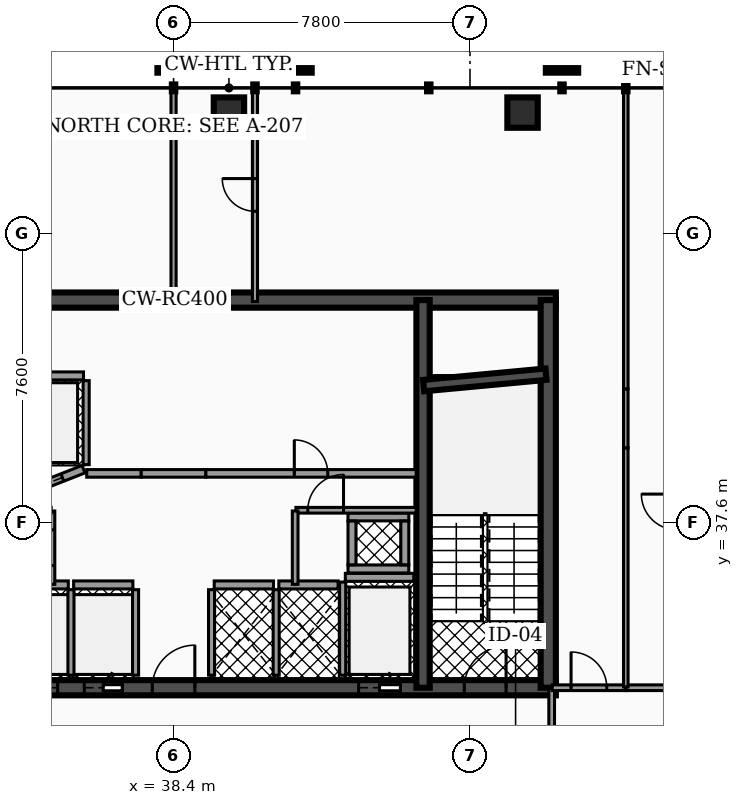
"""IFC4 building model, lengths in metres.
Left out: names, types, materials, properties, quantities, classifications, styles, units other than length and angle.
Written with IfcOpenShell. Run it as: python <this file> out.ifc"""

import sys

from ifc_helpers import new_model, si_unit, direction, frame, frame_2d, origin, origin_2d, place, context, subcontext, project, spatial, rectangle, hollow_rectangle, extrude, element, fill, save


model = new_model("IFC4")
c1 = context("Model", 3, precision=1e-05, world=origin(), true_north=direction((0.0, 1.0)))
c2 = subcontext(c1, "Body", "Model", "MODEL_VIEW")
j1 = project(units=[si_unit("LENGTHUNIT", "METRE"), si_unit("PLANEANGLEUNIT", "RADIAN")], contexts=[c1])
p1 = place(None, origin())
s1 = spatial("IfcSite", under=j1, at=p1, CompositionType="ELEMENT")
p2 = place(p1, origin())
s2 = spatial("IfcBuilding", under=s1, at=p2, CompositionType="ELEMENT")
p3 = place(p2, frame((0.0, 0.0, 149.6)))
s3 = spatial("IfcBuildingStorey", under=s2, at=p3, CompositionType="ELEMENT", Elevation=149.6)
p4 = place(p3, frame((28.4, 43.45, 0.0), z_axis=(0.0, 0.0, 1.0), x_axis=(1.0, 0.0, 0.0)))
e1 = element("IfcWall", 1, at=p4, inside=s3, PredefinedType="SHEAR", context=c2, shape_type="SweptSolid", body=[
    extrude(rectangle(XDim=20.06, YDim=0.4, at=frame_2d((10.03, 0.0))), origin(), (0.0, 0.0, 1.0), 3.5),
])
p5 = place(p3, frame((28.4, 33.25, 0.0), z_axis=(0.0, 0.0, 1.0), x_axis=(1.0, 0.0, 0.0)))
e2 = element("IfcWall", 2, at=p5, inside=s3, PredefinedType="SHEAR", context=c2, shape_type="SweptSolid", body=[
    extrude(rectangle(XDim=20.06, YDim=0.4, at=frame_2d((10.03, 0.0))), origin(), (0.0, 0.0, 1.0), 3.5),
])
p6 = place(p5, frame((4.03, 0.0, 0.0)))
e3 = element("IfcOpeningElement", 3, at=p6, cuts=e2, PredefinedType="OPENING", context=c2, shape_type="SweptSolid", body=[
    extrude(rectangle(XDim=1.1, YDim=2.15, at=frame_2d((0.55, 1.075))), frame((0.0, 0.21, 0.0), z_axis=(0.0, -1.0, 0.0), x_axis=(1.0, 0.0, 0.0)), (0.0, 0.0, 1.0), 0.42),
])
p7 = place(p5, frame((14.87, 0.0, 0.0)))
e4 = element("IfcOpeningElement", 4, at=p7, cuts=e2, PredefinedType="OPENING", context=c2, shape_type="SweptSolid", body=[
    extrude(rectangle(XDim=1.1, YDim=2.15, at=frame_2d((0.55, 1.075))), frame((0.0, 0.21, 0.0), z_axis=(0.0, -1.0, 0.0), x_axis=(1.0, 0.0, 0.0)), (0.0, 0.0, 1.0), 0.42),
])
p8 = place(p5, frame((5.95, 0.0, 0.0)))
e5 = element("IfcOpeningElement", 5, at=p8, cuts=e2, PredefinedType="OPENING", context=c2, shape_type="SweptSolid", body=[
    extrude(rectangle(XDim=1.0, YDim=2.1, at=frame_2d((0.5, 1.05))), frame((0.0, 0.21, 0.0), z_axis=(0.0, -1.0, 0.0), x_axis=(1.0, 0.0, 0.0)), (0.0, 0.0, 1.0), 0.42),
])
p9 = place(p5, frame((7.65, 0.0, 0.0)))
e6 = element("IfcOpeningElement", 6, at=p9, cuts=e2, PredefinedType="OPENING", context=c2, shape_type="SweptSolid", body=[
    extrude(rectangle(XDim=1.0, YDim=2.1, at=frame_2d((0.5, 1.05))), frame((0.0, 0.21, 0.0), z_axis=(0.0, -1.0, 0.0), x_axis=(1.0, 0.0, 0.0)), (0.0, 0.0, 1.0), 0.42),
])
p10 = place(p5, frame((1.31, 0.0, 0.0)))
e7 = element("IfcOpeningElement", 7, at=p10, cuts=e2, PredefinedType="OPENING", context=c2, shape_type="SweptSolid", body=[
    extrude(rectangle(XDim=1.1, YDim=2.2, at=frame_2d((0.55, 1.1))), frame((0.0, 0.21, 0.0), z_axis=(0.0, -1.0, 0.0), x_axis=(1.0, 0.0, 0.0)), (0.0, 0.0, 1.0), 0.42),
])
p11 = place(p5, frame((9.44, 0.0, 0.0)))
e8 = element("IfcOpeningElement", 8, at=p11, cuts=e2, PredefinedType="OPENING", context=c2, shape_type="SweptSolid", body=[
    extrude(rectangle(XDim=1.12, YDim=2.05, at=frame_2d((0.56, 1.025))), frame((0.0, 0.21, 0.0), z_axis=(0.0, -1.0, 0.0), x_axis=(1.0, 0.0, 0.0)), (0.0, 0.0, 1.0), 0.42),
])
p12 = place(p5, frame((17.65, 0.0, 0.0)))
e9 = element("IfcOpeningElement", 9, at=p12, cuts=e2, PredefinedType="OPENING", context=c2, shape_type="SweptSolid", body=[
    extrude(rectangle(XDim=1.1, YDim=2.2, at=frame_2d((0.55, 1.1))), frame((0.0, 0.21, 0.0), z_axis=(0.0, -1.0, 0.0), x_axis=(1.0, 0.0, 0.0)), (0.0, 0.0, 1.0), 0.42),
])
p13 = place(p3, frame((44.965, 33.25, 0.0), z_axis=(0.0, 0.0, 1.0), x_axis=(0.0, 1.0, 0.0)))
e10 = element("IfcWall", 10, at=p13, inside=s3, PredefinedType="SHEAR", context=c2, shape_type="SweptSolid", body=[
    extrude(rectangle(XDim=10.2, YDim=0.35, at=frame_2d((5.1, 0.0))), origin(), (0.0, 0.0, 1.0), 3.5),
])
p14 = place(p3, frame((48.26, 33.25, 0.0), z_axis=(0.0, 0.0, 1.0), x_axis=(0.0, 1.0, 0.0)))
e11 = element("IfcWall", 11, at=p14, inside=s3, PredefinedType="SHEAR", context=c2, shape_type="SweptSolid", body=[
    extrude(rectangle(XDim=10.2, YDim=0.4, at=frame_2d((5.1, 0.0))), origin(), (0.0, 0.0, 1.0), 3.5),
])
p15 = place(p3, frame((44.98, 41.2, 0.0), z_axis=(0.0, 0.0, 1.0), x_axis=(0.995686468965, 0.09278176286, 0.0)))
e12 = element("IfcWall", 12, at=p15, inside=s3, PredefinedType="SHEAR", context=c2, shape_type="SweptSolid", body=[
    extrude(rectangle(XDim=3.234, YDim=0.3, at=frame_2d((1.617, 0.0))), origin(), (0.0, 0.0, 1.0), 3.5),
])
for number, where, z_axis, x_axis in (
    (13, (47.583, 48.383, 0.0), (0.0, 0.0, 1.0), (1.0, 0.0, 0.0)),
    (14, (39.857, 48.383, 0.0), (0.0, 0.0, 1.0), (1.0, 0.0, 0.0)),
):
    element("IfcColumn", number, at=place(p3, frame(where, z_axis=z_axis, x_axis=x_axis)), inside=s3, PredefinedType="COLUMN", context=c2, shape_type="SweptSolid", body=[
        extrude(hollow_rectangle(XDim=0.8, YDim=0.8, WallThickness=0.04, at=origin_2d()), origin(), (0.0, 0.0, 1.0), 3.5),
    ])
p16 = place(p3, frame((42.92, 36.155, 0.0), z_axis=(0.0, 0.0, 1.0), x_axis=(1.0, 0.0, 0.0)))
e15 = element("IfcWall", 15, at=p16, inside=s3, PredefinedType="SOLIDWALL", context=c2, shape_type="SweptSolid", body=[
    extrude(rectangle(XDim=1.8, YDim=0.21, at=frame_2d((0.9, 0.0))), origin(), (0.0, 0.0, 1.0), 2.472),
])
p17 = place(p3, frame((42.85, 33.58, 0.0), z_axis=(0.0, 0.0, 1.0), x_axis=(0.0, 1.0, 0.0)))
e16 = element("IfcWall", 16, at=p17, inside=s3, PredefinedType="SOLIDWALL", context=c2, shape_type="SweptSolid", body=[
    extrude(rectangle(XDim=2.45, YDim=0.16, at=frame_2d((1.225, 0.0))), origin(), (0.0, 0.0, 1.0), 2.472),
])
p18 = place(p3, frame((34.07, 35.955, 0.0), z_axis=(0.0, 0.0, 1.0), x_axis=(1.0, 0.0, 0.0)))
e17 = element("IfcWall", 17, at=p18, inside=s3, PredefinedType="SOLIDWALL", context=c2, shape_type="SweptSolid", body=[
    extrude(rectangle(XDim=1.56, YDim=0.21, at=frame_2d((0.78, 0.0))), origin(), (0.0, 0.0, 1.0), 2.472),
])
p19 = place(p3, frame((35.7, 33.58, 0.0), z_axis=(0.0, 0.0, 1.0), x_axis=(0.0, 1.0, 0.0)))
e18 = element("IfcWall", 18, at=p19, inside=s3, PredefinedType="SOLIDWALL", context=c2, shape_type="SweptSolid", body=[
    extrude(rectangle(XDim=2.25, YDim=0.16, at=frame_2d((1.125, 0.0))), origin(), (0.0, 0.0, 1.0), 2.472),
])
p20 = place(p3, frame((35.77, 35.955, 0.0), z_axis=(0.0, 0.0, 1.0), x_axis=(1.0, 0.0, 0.0)))
e19 = element("IfcWall", 19, at=p20, inside=s3, PredefinedType="SOLIDWALL", context=c2, shape_type="SweptSolid", body=[
    extrude(rectangle(XDim=1.56, YDim=0.21, at=frame_2d((0.78, 0.0))), origin(), (0.0, 0.0, 1.0), 2.472),
])
p21 = place(p3, frame((37.4, 33.58, 0.0), z_axis=(0.0, 0.0, 1.0), x_axis=(0.0, 1.0, 0.0)))
e20 = element("IfcWall", 20, at=p21, inside=s3, PredefinedType="SOLIDWALL", context=c2, shape_type="SweptSolid", body=[
    extrude(rectangle(XDim=2.25, YDim=0.16, at=frame_2d((1.125, 0.0))), origin(), (0.0, 0.0, 1.0), 2.472),
])
p22 = place(p3, frame((34.12, 38.25, 0.0), z_axis=(0.0, 0.0, 1.0), x_axis=(0.930804993012, 0.36551616241, 0.0)))
e21 = element("IfcWall", 21, at=p22, inside=s3, PredefinedType="SOLIDWALL", context=c2, shape_type="SweptSolid", body=[
    extrude(rectangle(XDim=2.052, YDim=0.21, at=frame_2d((1.026, 0.0))), origin(), (0.0, 0.0, 1.0), 2.472),
])
p23 = place(p22, frame((0.455, 0.0, 0.0)))
e22 = element("IfcOpeningElement", 22, at=p23, cuts=e21, PredefinedType="OPENING", context=c2, shape_type="SweptSolid", body=[
    extrude(rectangle(XDim=1.0, YDim=2.1, at=frame_2d((0.5, 1.05))), frame((0.0, 0.115, 0.0), z_axis=(0.0, -1.0, 0.0), x_axis=(1.0, 0.0, 0.0)), (0.0, 0.0, 1.0), 0.23),
])
p24 = place(p3, frame((34.12, 41.455, 0.0), z_axis=(0.0, 0.0, 1.0), x_axis=(1.0, 0.0, 0.0)))
e23 = element("IfcWall", 23, at=p24, inside=s3, PredefinedType="SOLIDWALL", context=c2, shape_type="SweptSolid", body=[
    extrude(rectangle(XDim=1.91, YDim=0.21, at=frame_2d((0.955, 0.0))), origin(), (0.0, 0.0, 1.0), 2.472),
])
p25 = place(p3, frame((36.1, 39.12, 0.0), z_axis=(0.0, 0.0, 1.0), x_axis=(0.0, 1.0, 0.0)))
e24 = element("IfcWall", 24, at=p25, inside=s3, PredefinedType="SOLIDWALL", context=c2, shape_type="SweptSolid", body=[
    extrude(rectangle(XDim=2.21, YDim=0.16, at=frame_2d((1.105, 0.0))), origin(), (0.0, 0.0, 1.0), 2.472),
])
p26 = place(p3, frame((39.47, 35.955, 0.0), z_axis=(0.0, 0.0, 1.0), x_axis=(1.0, 0.0, 0.0)))
e25 = element("IfcWall", 25, at=p26, inside=s3, PredefinedType="SOLIDWALL", context=c2, shape_type="SweptSolid", body=[
    extrude(rectangle(XDim=1.56, YDim=0.21, at=frame_2d((0.78, 0.0))), origin(), (0.0, 0.0, 1.0), 2.472),
])
for number, where, z_axis, x_axis in (
    (26, (39.4, 33.58, 0.0), (0.0, 0.0, 1.0), (0.0, 1.0, 0.0)),
    (27, (41.1, 33.58, 0.0), (0.0, 0.0, 1.0), (0.0, 1.0, 0.0)),
):
    element("IfcWall", number, at=place(p3, frame(where, z_axis=z_axis, x_axis=x_axis)), inside=s3, PredefinedType="SOLIDWALL", context=c2, shape_type="SweptSolid", body=[
        extrude(rectangle(XDim=2.25, YDim=0.16, at=frame_2d((1.125, 0.0))), origin(), (0.0, 0.0, 1.0), 2.472),
    ])
p27 = place(p3, frame((41.17, 35.955, 0.0), z_axis=(0.0, 0.0, 1.0), x_axis=(1.0, 0.0, 0.0)))
e28 = element("IfcWall", 28, at=p27, inside=s3, PredefinedType="SOLIDWALL", context=c2, shape_type="SweptSolid", body=[
    extrude(rectangle(XDim=1.56, YDim=0.21, at=frame_2d((0.78, 0.0))), origin(), (0.0, 0.0, 1.0), 2.472),
])
for number, where, z_axis, x_axis in (
    (29, (42.99, 36.375, 0.0), (0.0, 0.0, 1.0), (1.0, 0.0, 0.0)),
    (30, (42.99, 37.745, 0.0), (0.0, 0.0, 1.0), (1.0, 0.0, 0.0)),
):
    element("IfcWall", number, at=place(p3, frame(where, z_axis=z_axis, x_axis=x_axis)), inside=s3, PredefinedType="SOLIDWALL", context=c2, shape_type="SweptSolid", body=[
        extrude(rectangle(XDim=1.6, YDim=0.21, at=frame_2d((0.8, 0.0))), origin(), (0.0, 0.0, 1.0), 3.5),
    ])
for number, where, z_axis, x_axis in (
    (31, (43.095, 36.485, 0.0), (0.0, 0.0, 1.0), (0.0, 1.0, 0.0)),
    (32, (44.485, 36.485, 0.0), (0.0, 0.0, 1.0), (0.0, 1.0, 0.0)),
):
    element("IfcWall", number, at=place(p3, frame(where, z_axis=z_axis, x_axis=x_axis)), inside=s3, PredefinedType="SOLIDWALL", context=c2, shape_type="SweptSolid", body=[
        extrude(rectangle(XDim=1.15, YDim=0.21, at=frame_2d((0.575, 0.0))), origin(), (0.0, 0.0, 1.0), 3.5),
    ])
p28 = place(p3, frame((35.2, 35.97, 0.0), z_axis=(0.0, 0.0, 1.0), x_axis=(0.0, 1.0, 0.0)))
e33 = element("IfcWall", 33, at=p28, inside=s3, PredefinedType="PARTITIONING", context=c2, shape_type="SweptSolid", body=[
    extrude(rectangle(XDim=1.93, YDim=0.15, at=frame_2d((0.965, 0.0))), origin(), (0.0, 0.0, 1.0), 2.457),
])
p29 = place(p28, frame((0.495, 0.0, 0.0)))
e34 = element("IfcOpeningElement", 34, at=p29, cuts=e33, PredefinedType="OPENING", context=c2, shape_type="SweptSolid", body=[
    extrude(rectangle(XDim=0.94, YDim=2.05, at=frame_2d((0.47, 1.025))), frame((0.0, 0.085, 0.0), z_axis=(0.0, -1.0, 0.0), x_axis=(1.0, 0.0, 0.0)), (0.0, 0.0, 1.0), 0.17),
])
p30 = place(p3, frame((36.115, 38.89, 0.0), z_axis=(0.0, 0.0, 1.0), x_axis=(1.0, 0.0, 0.0)))
e35 = element("IfcWall", 35, at=p30, inside=s3, PredefinedType="PARTITIONING", context=c2, shape_type="SweptSolid", body=[
    extrude(rectangle(XDim=1.435, YDim=0.2, at=frame_2d((0.718, 0.0))), origin(), (0.0, 0.0, 1.0), 2.457),
])
p31 = place(p3, frame((37.55, 38.89, 0.0), z_axis=(0.0, 0.0, 1.0), x_axis=(1.0, 0.0, 0.0)))
e36 = element("IfcWall", 36, at=p31, inside=s3, PredefinedType="PARTITIONING", context=c2, shape_type="SweptSolid", body=[
    extrude(rectangle(XDim=1.7, YDim=0.2, at=frame_2d((0.85, 0.0))), origin(), (0.0, 0.0, 1.0), 2.457),
])
p32 = place(p3, frame((39.25, 38.89, 0.0), z_axis=(0.0, 0.0, 1.0), x_axis=(1.0, 0.0, 0.0)))
e37 = element("IfcWall", 37, at=p32, inside=s3, PredefinedType="PARTITIONING", context=c2, shape_type="SweptSolid", body=[
    extrude(rectangle(XDim=5.535, YDim=0.2, at=frame_2d((2.768, 0.0))), origin(), (0.0, 0.0, 1.0), 2.457),
])
p33 = place(p32, frame((2.327, 0.0, 0.0)))
e38 = element("IfcOpeningElement", 38, at=p33, cuts=e37, PredefinedType="OPENING", context=c2, shape_type="SweptSolid", body=[
    extrude(rectangle(XDim=0.88, YDim=2.05, at=frame_2d((0.44, 1.025))), frame((0.0, 0.11, 0.0), z_axis=(0.0, -1.0, 0.0), x_axis=(1.0, 0.0, 0.0)), (0.0, 0.0, 1.0), 0.22),
])
p34 = place(p3, frame((41.62, 37.92, 0.0), z_axis=(0.0, 0.0, 1.0), x_axis=(1.0, 0.0, 0.0)))
e39 = element("IfcWall", 39, at=p34, inside=s3, PredefinedType="PARTITIONING", context=c2, shape_type="SweptSolid", body=[
    extrude(rectangle(XDim=3.165, YDim=0.15, at=frame_2d((1.583, 0.0))), origin(), (0.0, 0.0, 1.0), 2.457),
])
p35 = place(p34, frame((0.312, 0.0, 0.0)))
e40 = element("IfcOpeningElement", 40, at=p35, cuts=e39, PredefinedType="OPENING", context=c2, shape_type="SweptSolid", body=[
    extrude(rectangle(XDim=0.94, YDim=2.05, at=frame_2d((0.47, 1.025))), frame((0.0, 0.085, 0.0), z_axis=(0.0, -1.0, 0.0), x_axis=(1.0, 0.0, 0.0)), (0.0, 0.0, 1.0), 0.17),
])
p36 = place(p3, frame((41.6, 35.97, 0.0), z_axis=(0.0, 0.0, 1.0), x_axis=(0.0, 1.0, 0.0)))
e41 = element("IfcWall", 41, at=p36, inside=s3, PredefinedType="PARTITIONING", context=c2, shape_type="SweptSolid", body=[
    extrude(rectangle(XDim=1.93, YDim=0.15, at=frame_2d((0.965, 0.0))), origin(), (0.0, 0.0, 1.0), 2.457),
])
p37 = place(p3, frame((48.35, 30.17, 0.0), z_axis=(0.0, 0.0, 1.0), x_axis=(0.0, 1.0, 0.0)))
e42 = element("IfcWall", 42, at=p37, inside=s3, PredefinedType="PARTITIONING", context=c2, shape_type="SweptSolid", body=[
    extrude(rectangle(XDim=3.06, YDim=0.15, at=frame_2d((1.53, 0.0))), origin(), (0.0, 0.0, 1.0), 2.457),
])
p38 = place(p37, frame((1.06, 0.0, 0.0)))
e43 = element("IfcOpeningElement", 43, at=p38, cuts=e42, PredefinedType="OPENING", context=c2, shape_type="SweptSolid", body=[
    extrude(rectangle(XDim=0.94, YDim=2.05, at=frame_2d((0.47, 1.025))), frame((0.0, 0.085, 0.0), z_axis=(0.0, -1.0, 0.0), x_axis=(1.0, 0.0, 0.0)), (0.0, 0.0, 1.0), 0.17),
])
p39 = place(p3, frame((50.305, 33.25, 0.0), z_axis=(0.0, 0.0, 1.0), x_axis=(1.0, 0.0, 0.0)))
e44 = element("IfcWall", 44, at=p39, inside=s3, PredefinedType="PARTITIONING", context=c2, shape_type="SweptSolid", body=[
    extrude(rectangle(XDim=1.325, YDim=0.15, at=frame_2d((0.663, 0.0))), origin(), (0.0, 0.0, 1.0), 2.457),
])
p40 = place(p3, frame((48.365, 33.25, 0.0), z_axis=(0.0, 0.0, 1.0), x_axis=(1.0, 0.0, 0.0)))
e45 = element("IfcWall", 45, at=p40, inside=s3, PredefinedType="PARTITIONING", context=c2, shape_type="SweptSolid", body=[
    extrude(rectangle(XDim=1.93, YDim=0.15, at=frame_2d((0.965, 0.0))), origin(), (0.0, 0.0, 1.0), 2.457),
])
p41 = place(p40, frame((0.495, 0.0, 0.0)))
e46 = element("IfcOpeningElement", 46, at=p41, cuts=e45, PredefinedType="OPENING", context=c2, shape_type="SweptSolid", body=[
    extrude(rectangle(XDim=0.94, YDim=2.05, at=frame_2d((0.47, 1.025))), frame((0.0, 0.085, 0.0), z_axis=(0.0, -1.0, 0.0), x_axis=(1.0, 0.0, 0.0)), (0.0, 0.0, 1.0), 0.17),
])
p42 = place(p3, frame((38.4, 43.415, 0.0), z_axis=(0.0, 0.0, 1.0), x_axis=(0.0, 1.0, 0.0)))
e47 = element("IfcWall", 47, at=p42, inside=s3, PredefinedType="PARTITIONING", context=c2, shape_type="SweptSolid", body=[
    extrude(rectangle(XDim=5.603, YDim=0.135, at=frame_2d((2.802, 0.0))), origin(), (0.0, 0.0, 1.0), 2.457),
])
p43 = place(p3, frame((50.3, 33.27, 0.0), z_axis=(0.0, 0.0, 1.0), x_axis=(0.0, 1.0, 0.0)))
e48 = element("IfcWall", 48, at=p43, inside=s3, PredefinedType="PARTITIONING", context=c2, shape_type="SweptSolid", body=[
    extrude(rectangle(XDim=6.292, YDim=0.12, at=frame_2d((3.146, 0.0))), origin(), (0.0, 0.0, 1.0), 2.457),
])
p44 = place(p3, frame((50.3, 39.562, 0.0), z_axis=(0.0, 0.0, 1.0), x_axis=(0.0, 1.0, 0.0)))
e49 = element("IfcWall", 49, at=p44, inside=s3, PredefinedType="PARTITIONING", context=c2, shape_type="SweptSolid", body=[
    extrude(rectangle(XDim=1.55, YDim=0.12, at=frame_2d((0.775, 0.0))), origin(), (0.0, 0.0, 1.0), 2.457),
])
p45 = place(p3, frame((50.3, 41.112, 0.0), z_axis=(0.0, 0.0, 1.0), x_axis=(0.0, 1.0, 0.0)))
e50 = element("IfcWall", 50, at=p45, inside=s3, PredefinedType="PARTITIONING", context=c2, shape_type="SweptSolid", body=[
    extrude(rectangle(XDim=7.907, YDim=0.12, at=frame_2d((3.953, 0.0))), origin(), (0.0, 0.0, 1.0), 2.457),
])
p46 = place(p3, frame((40.542, 43.415, 0.0), z_axis=(0.0, 0.0, 1.0), x_axis=(0.0, 1.0, 0.0)))
e51 = element("IfcWall", 51, at=p46, inside=s3, PredefinedType="PARTITIONING", context=c2, shape_type="SweptSolid", body=[
    extrude(rectangle(XDim=5.603, YDim=0.135, at=frame_2d((2.802, 0.0))), origin(), (0.0, 0.0, 1.0), 2.457),
])
p47 = place(p46, frame((2.372, 0.0, 0.0)))
e52 = element("IfcOpeningElement", 52, at=p47, cuts=e51, PredefinedType="OPENING", context=c2, shape_type="SweptSolid", body=[
    extrude(rectangle(XDim=0.86, YDim=2.05, at=frame_2d((0.43, 1.025))), frame((0.0, 0.077, 0.0), z_axis=(0.0, -1.0, 0.0), x_axis=(1.0, 0.0, 0.0)), (0.0, 0.0, 1.0), 0.155),
])
p48 = place(p7, origin())
e53 = element("IfcDoor", 53, at=p48, inside=s3, OperationType="SLIDING_TO_RIGHT", PredefinedType="DOOR", context=c2, shape_type="SweptSolid", body=[
    extrude(rectangle(XDim=1.1, YDim=2.15, at=frame_2d((0.55, 1.075))), frame((0.0, 0.025, 0.0), z_axis=(0.0, -1.0, 0.0), x_axis=(1.0, 0.0, 0.0)), (0.0, 0.0, 1.0), 0.05),
])
fill(e4, e53)
p49 = place(p8, origin())
e54 = element("IfcDoor", 54, at=p49, inside=s3, OperationType="SLIDING_TO_LEFT", PredefinedType="DOOR", context=c2, shape_type="SweptSolid", body=[
    extrude(rectangle(XDim=1.0, YDim=2.1, at=frame_2d((0.5, 1.05))), frame((0.0, 0.025, 0.0), z_axis=(0.0, -1.0, 0.0), x_axis=(1.0, 0.0, 0.0)), (0.0, 0.0, 1.0), 0.05),
])
fill(e5, e54)
p50 = place(p9, origin())
e55 = element("IfcDoor", 55, at=p50, inside=s3, OperationType="SLIDING_TO_RIGHT", PredefinedType="DOOR", context=c2, shape_type="SweptSolid", body=[
    extrude(rectangle(XDim=1.0, YDim=2.1, at=frame_2d((0.5, 1.05))), frame((0.0, 0.025, 0.0), z_axis=(0.0, -1.0, 0.0), x_axis=(1.0, 0.0, 0.0)), (0.0, 0.0, 1.0), 0.05),
])
fill(e6, e55)
p51 = place(p23, origin())
e56 = element("IfcDoor", 56, at=p51, inside=s3, OperationType="SLIDING_TO_LEFT", PredefinedType="DOOR", context=c2, shape_type="SweptSolid", body=[
    extrude(rectangle(XDim=1.0, YDim=2.1, at=frame_2d((0.5, 1.05))), frame((0.0, 0.025, 0.0), z_axis=(0.0, -1.0, 0.0), x_axis=(1.0, 0.0, 0.0)), (0.0, 0.0, 1.0), 0.05),
])
fill(e22, e56)
p52 = place(p11, origin())
e57 = element("IfcDoor", 57, at=p52, inside=s3, OperationType="SINGLE_SWING_RIGHT", PredefinedType="DOOR", context=c2, shape_type="SweptSolid", body=[
    extrude(rectangle(XDim=1.12, YDim=2.05, at=frame_2d((0.56, 1.025))), frame((0.0, 0.025, 0.0), z_axis=(0.0, -1.0, 0.0), x_axis=(1.0, 0.0, 0.0)), (0.0, 0.0, 1.0), 0.05),
])
fill(e8, e57)
p53 = place(p12, origin())
e58 = element("IfcDoor", 58, at=p53, inside=s3, OperationType="SINGLE_SWING_RIGHT", PredefinedType="DOOR", context=c2, shape_type="SweptSolid", body=[
    extrude(rectangle(XDim=1.1, YDim=2.2, at=frame_2d((0.55, 1.1))), frame((0.0, 0.025, 0.0), z_axis=(0.0, -1.0, 0.0), x_axis=(1.0, 0.0, 0.0)), (0.0, 0.0, 1.0), 0.05),
])
fill(e9, e58)
p54 = place(p29, origin())
e59 = element("IfcDoor", 59, at=p54, inside=s3, OperationType="SINGLE_SWING_LEFT", PredefinedType="DOOR", context=c2, shape_type="SweptSolid", body=[
    extrude(rectangle(XDim=0.94, YDim=2.05, at=frame_2d((0.47, 1.025))), frame((0.0, 0.025, 0.0), z_axis=(0.0, -1.0, 0.0), x_axis=(1.0, 0.0, 0.0)), (0.0, 0.0, 1.0), 0.05),
])
fill(e34, e59)
p55 = place(p33, origin())
e60 = element("IfcDoor", 60, at=p55, inside=s3, OperationType="SINGLE_SWING_LEFT", PredefinedType="DOOR", context=c2, shape_type="SweptSolid", body=[
    extrude(rectangle(XDim=0.88, YDim=2.05, at=frame_2d((0.44, 1.025))), frame((0.0, 0.025, 0.0), z_axis=(0.0, -1.0, 0.0), x_axis=(1.0, 0.0, 0.0)), (0.0, 0.0, 1.0), 0.05),
])
fill(e38, e60)
p56 = place(p35, origin())
e61 = element("IfcDoor", 61, at=p56, inside=s3, OperationType="SINGLE_SWING_RIGHT", PredefinedType="DOOR", context=c2, shape_type="SweptSolid", body=[
    extrude(rectangle(XDim=0.94, YDim=2.05, at=frame_2d((0.47, 1.025))), frame((0.0, 0.025, 0.0), z_axis=(0.0, -1.0, 0.0), x_axis=(1.0, 0.0, 0.0)), (0.0, 0.0, 1.0), 0.05),
])
fill(e40, e61)
p57 = place(p41, origin())
e62 = element("IfcDoor", 62, at=p57, inside=s3, OperationType="SINGLE_SWING_LEFT", PredefinedType="DOOR", context=c2, shape_type="SweptSolid", body=[
    extrude(rectangle(XDim=0.94, YDim=2.05, at=frame_2d((0.47, 1.025))), frame((0.0, 0.025, 0.0), z_axis=(0.0, -1.0, 0.0), x_axis=(1.0, 0.0, 0.0)), (0.0, 0.0, 1.0), 0.05),
])
fill(e46, e62)
p58 = place(p47, origin())
e63 = element("IfcDoor", 63, at=p58, inside=s3, OperationType="SINGLE_SWING_RIGHT", PredefinedType="DOOR", context=c2, shape_type="SweptSolid", body=[
    extrude(rectangle(XDim=0.86, YDim=2.05, at=frame_2d((0.43, 1.025))), frame((0.0, 0.025, 0.0), z_axis=(0.0, -1.0, 0.0), x_axis=(1.0, 0.0, 0.0)), (0.0, 0.0, 1.0), 0.05),
])
fill(e52, e63)
save(model, sys.argv[1])
